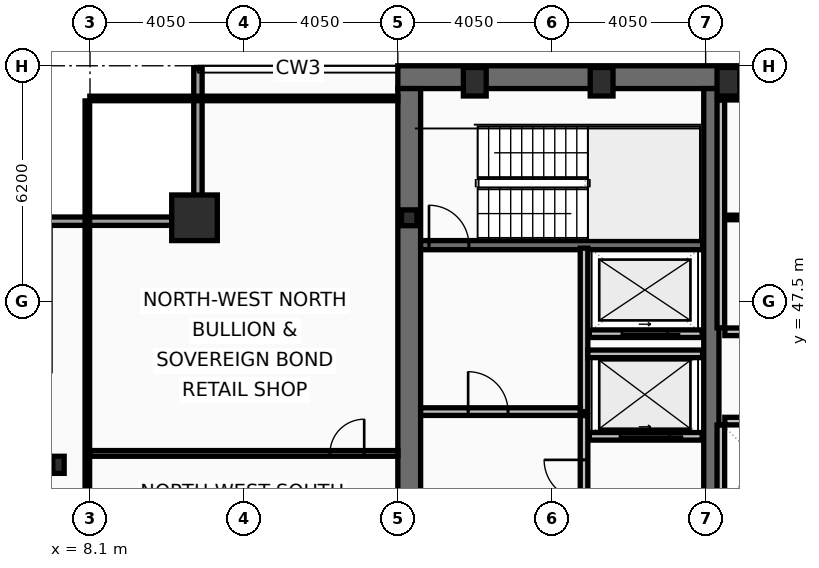
"""IFC4 building model, lengths in metres.
Left out: names, types, materials, properties, quantities, classifications, styles, units other than length and angle.
Written with IfcOpenShell. Run it as: python <this file> out.ifc"""

import sys

from ifc_helpers import new_model, si_unit, direction, frame, frame_2d, origin, origin_2d, place, context, subcontext, project, spatial, rectangle, hollow_rectangle, i_section, extrude, element, fill, save


model = new_model("IFC4")
c1 = context("Model", 3, precision=1e-05, world=origin(), true_north=direction((0.0, 1.0)))
c2 = subcontext(c1, "Body", "Model", "MODEL_VIEW")
j1 = project(units=[si_unit("LENGTHUNIT", "METRE"), si_unit("PLANEANGLEUNIT", "RADIAN")], contexts=[c1])
p1 = place(None, origin())
s1 = spatial("IfcSite", under=j1, at=p1, CompositionType="ELEMENT")
p2 = place(p1, origin())
s2 = spatial("IfcBuilding", under=s1, at=p2, CompositionType="ELEMENT")
p3 = place(p2, frame((0.0, 0.0, 188.6)))
s3 = spatial("IfcBuildingStorey", under=s2, at=p3, CompositionType="ELEMENT", Elevation=188.6)
p4 = place(p3, frame((16.2, 53.4, 0.0), z_axis=(0.0, 0.0, 1.0), x_axis=(1.0, 0.0, 0.0)))
e1 = element("IfcWall", 1, at=p4, inside=s3, PredefinedType="SHEAR", context=c2, shape_type="SweptSolid", body=[
    extrude(rectangle(XDim=40.5, YDim=0.6, at=frame_2d((20.25, 0.0))), origin(), (0.0, 0.0, 1.0), 3.44),
])
p5 = place(p3, frame((16.5, 41.9, 0.0), z_axis=(0.0, 0.0, 1.0), x_axis=(0.0, 1.0, 0.0)))
e2 = element("IfcWall", 2, at=p5, inside=s3, PredefinedType="SHEAR", context=c2, shape_type="SweptSolid", body=[
    extrude(rectangle(XDim=11.2, YDim=0.6, at=frame_2d((5.6, 0.0))), origin(), (0.0, 0.0, 1.0), 3.44),
])
p6 = place(p3, frame((24.45, 41.9, 0.0), z_axis=(0.0, 0.0, 1.0), x_axis=(0.0, 1.0, 0.0)))
e3 = element("IfcWall", 3, at=p6, inside=s3, PredefinedType="SHEAR", context=c2, shape_type="SweptSolid", body=[
    extrude(rectangle(XDim=11.2, YDim=0.4, at=frame_2d((5.6, 0.0))), origin(), (0.0, 0.0, 1.0), 3.44),
])
p7 = place(p3, frame((16.8, 48.98, 0.0), z_axis=(0.0, 0.0, 1.0), x_axis=(1.0, 0.0, 0.0)))
e4 = element("IfcWall", 4, at=p7, inside=s3, PredefinedType="SHEAR", context=c2, shape_type="SweptSolid", body=[
    extrude(rectangle(XDim=7.42, YDim=0.24, at=frame_2d((3.71, 0.0))), origin(), (0.0, 0.0, 1.0), 3.44),
])
p8 = place(p7, frame((0.22, 0.0, 0.0)))
e5 = element("IfcOpeningElement", 5, at=p8, cuts=e4, PredefinedType="OPENING", context=c2, shape_type="SweptSolid", body=[
    extrude(rectangle(XDim=1.05, YDim=2.15, at=frame_2d((0.525, 1.075))), frame((0.0, 0.13, 0.0), z_axis=(0.0, -1.0, 0.0), x_axis=(1.0, 0.0, 0.0)), (0.0, 0.0, 1.0), 0.26),
])
p9 = place(p3, frame((10.85, 49.7, 0.0), z_axis=(0.0, 0.0, 1.0), x_axis=(1.0, 0.0, 0.0)))
e6 = element("IfcColumn", 6, at=p9, inside=s3, PredefinedType="COLUMN", context=c2, shape_type="SweptSolid", body=[
    extrude(hollow_rectangle(XDim=1.2, YDim=1.2, WallThickness=0.06, at=origin_2d()), origin(), (0.0, 0.0, 1.0), 3.6),
])
for number, where, z_axis, x_axis in (
    (7, (18.225, 53.28, 0.0), (0.0, 0.0, 1.0), (1.0, 0.0, 0.0)),
    (8, (21.562, 53.28, 0.0), (0.0, 0.0, 1.0), (1.0, 0.0, 0.0)),
    (9, (24.9, 53.28, 0.0), (0.0, 0.0, 1.0), (1.0, 0.0, 0.0)),
):
    element("IfcColumn", number, at=place(p3, frame(where, z_axis=z_axis, x_axis=x_axis)), inside=s3, PredefinedType="COLUMN", context=c2, shape_type="SweptSolid", body=[
        extrude(hollow_rectangle(XDim=0.6, YDim=0.75, WallThickness=0.045, at=origin_2d()), origin(), (0.0, 0.0, 1.0), 3.6),
    ])
p10 = place(p3, frame((7.27, 43.2, 0.0), z_axis=(0.0, 0.0, 1.0), x_axis=(1.0, 0.0, 0.0)))
e10 = element("IfcColumn", 10, at=p10, inside=s3, PredefinedType="COLUMN", context=c2, shape_type="SweptSolid", body=[
    extrude(i_section(OverallWidth=0.3, OverallDepth=0.45, WebThickness=0.014, FlangeThickness=0.026, at=origin_2d()), origin(), (0.0, 0.0, 1.0), 3.6),
])
p11 = place(p3, frame((16.5, 49.7, 0.0), z_axis=(0.0, 0.0, 1.0), x_axis=(1.0, 0.0, 0.0)))
e11 = element("IfcColumn", 11, at=p11, inside=s3, PredefinedType="COLUMN", context=c2, shape_type="SweptSolid", body=[
    extrude(i_section(OverallWidth=0.406, OverallDepth=0.416, WebThickness=0.03, FlangeThickness=0.048, at=origin_2d()), origin(), (0.0, 0.0, 1.0), 3.6),
])
p12 = place(p3, frame((6.83, 49.61, 0.0), z_axis=(0.0, 0.0, 1.0), x_axis=(1.0, 0.0, 0.0)))
e12 = element("IfcWall", 12, at=p12, inside=s3, PredefinedType="SOLIDWALL", context=c2, shape_type="SweptSolid", body=[
    extrude(rectangle(XDim=4.22, YDim=0.22, at=frame_2d((2.11, 0.0))), origin(), (0.0, 0.0, 1.0), 2.83),
])
p13 = place(p3, frame((10.94, 49.72, 0.0), z_axis=(0.0, 0.0, 1.0), x_axis=(0.0, 1.0, 0.0)))
e13 = element("IfcWall", 13, at=p13, inside=s3, PredefinedType="SOLIDWALL", context=c2, shape_type="SweptSolid", body=[
    extrude(rectangle(XDim=3.91, YDim=0.22, at=frame_2d((1.955, 0.0))), origin(), (0.0, 0.0, 1.0), 2.83),
])
p14 = place(p3, frame((24.21, 43.95, 0.0), z_axis=(0.0, 0.0, 1.0), x_axis=(-1.0, 0.0, 0.0)))
e14 = element("IfcWall", 14, at=p14, inside=s3, PredefinedType="PARTITIONING", context=c2, shape_type="SweptSolid", body=[
    extrude(rectangle(XDim=2.97, YDim=0.2, at=frame_2d((1.485, 0.0))), origin(), (0.0, 0.0, 1.0), 3.44),
])
p15 = place(p14, frame((0.86, 0.0, 0.0)))
e15 = element("IfcOpeningElement", 15, at=p15, cuts=e14, PredefinedType="OPENING", context=c2, shape_type="SweptSolid", body=[
    extrude(rectangle(XDim=1.3, YDim=2.18, at=frame_2d((0.65, 1.09))), frame((0.0, 0.11, 0.0), z_axis=(0.0, -1.0, 0.0), x_axis=(1.0, 0.0, 0.0)), (0.0, 0.0, 1.0), 0.22),
])
p16 = place(p3, frame((24.21, 46.65, 0.0), z_axis=(0.0, 0.0, 1.0), x_axis=(-1.0, 0.0, 0.0)))
e16 = element("IfcWall", 16, at=p16, inside=s3, PredefinedType="PARTITIONING", context=c2, shape_type="SweptSolid", body=[
    extrude(rectangle(XDim=2.97, YDim=0.2, at=frame_2d((1.485, 0.0))), origin(), (0.0, 0.0, 1.0), 3.44),
])
p17 = place(p16, frame((0.91, 0.0, 0.0)))
e17 = element("IfcOpeningElement", 17, at=p17, cuts=e16, PredefinedType="OPENING", context=c2, shape_type="SweptSolid", body=[
    extrude(rectangle(XDim=1.2, YDim=2.18, at=frame_2d((0.6, 1.09))), frame((0.0, 0.11, 0.0), z_axis=(0.0, -1.0, 0.0), x_axis=(1.0, 0.0, 0.0)), (0.0, 0.0, 1.0), 0.22),
])
p18 = place(p3, frame((21.1, 44.6, 0.0), z_axis=(0.0, 0.0, 1.0), x_axis=(0.0, 1.0, 0.0)))
e18 = element("IfcWall", 18, at=p18, inside=s3, PredefinedType="PARTITIONING", context=c2, shape_type="SweptSolid", body=[
    extrude(rectangle(XDim=4.3, YDim=0.2, at=frame_2d((2.15, 0.0))), origin(), (0.0, 0.0, 1.0), 3.44),
])
p19 = place(p3, frame((16.8, 44.6, 0.0), z_axis=(0.0, 0.0, 1.0), x_axis=(1.0, 0.0, 0.0)))
e19 = element("IfcWall", 19, at=p19, inside=s3, PredefinedType="PARTITIONING", context=c2, shape_type="SweptSolid", body=[
    extrude(rectangle(XDim=4.2, YDim=0.2, at=frame_2d((2.1, 0.0))), origin(), (0.0, 0.0, 1.0), 3.44),
])
p20 = place(p19, frame((1.25, 0.0, 0.0)))
e20 = element("IfcOpeningElement", 20, at=p20, cuts=e19, PredefinedType="OPENING", context=c2, shape_type="SweptSolid", body=[
    extrude(rectangle(XDim=1.05, YDim=2.15, at=frame_2d((0.525, 1.075))), frame((0.0, 0.11, 0.0), z_axis=(0.0, -1.0, 0.0), x_axis=(1.0, 0.0, 0.0)), (0.0, 0.0, 1.0), 0.22),
])
p21 = place(p3, frame((21.2, 46.12, 0.0), z_axis=(0.0, 0.0, 1.0), x_axis=(1.0, 0.0, 0.0)))
e21 = element("IfcWall", 21, at=p21, inside=s3, PredefinedType="PARTITIONING", context=c2, shape_type="SweptSolid", body=[
    extrude(rectangle(XDim=3.02, YDim=0.2, at=frame_2d((1.51, 0.0))), origin(), (0.0, 0.0, 1.0), 3.44),
])
p22 = place(p3, frame((21.1, 41.9, 0.0), z_axis=(0.0, 0.0, 1.0), x_axis=(0.0, 1.0, 0.0)))
e22 = element("IfcWall", 22, at=p22, inside=s3, PredefinedType="PARTITIONING", context=c2, shape_type="SweptSolid", body=[
    extrude(rectangle(XDim=2.595, YDim=0.2, at=frame_2d((1.298, 0.0))), origin(), (0.0, 0.0, 1.0), 3.44),
])
p23 = place(p22, frame((0.38, 0.0, 0.0)))
e23 = element("IfcOpeningElement", 23, at=p23, cuts=e22, PredefinedType="OPENING", context=c2, shape_type="SweptSolid", body=[
    extrude(rectangle(XDim=1.05, YDim=2.15, at=frame_2d((0.525, 1.075))), frame((0.0, 0.11, 0.0), z_axis=(0.0, -1.0, 0.0), x_axis=(1.0, 0.0, 0.0)), (0.0, 0.0, 1.0), 0.22),
])
p24 = place(p3, frame((24.7, 46.805, 0.0), z_axis=(0.0, 0.0, 1.0), x_axis=(0.0, 1.0, 0.0)))
e24 = element("IfcWall", 24, at=p24, inside=s3, PredefinedType="PARTITIONING", context=c2, shape_type="SweptSolid", body=[
    extrude(rectangle(XDim=5.99, YDim=0.2, at=frame_2d((2.995, 0.0))), origin(), (0.0, 0.0, 1.0), 3.44),
])
p25 = place(p3, frame((24.805, 52.86, 0.0), z_axis=(0.0, 0.0, 1.0), x_axis=(1.0, 0.0, 0.0)))
e25 = element("IfcWall", 25, at=p25, inside=s3, PredefinedType="PARTITIONING", context=c2, shape_type="SweptSolid", body=[
    extrude(rectangle(XDim=7.51, YDim=0.12, at=frame_2d((3.755, 0.0))), origin(), (0.0, 0.0, 1.0), 3.44),
])
p26 = place(p3, frame((24.805, 49.709, 0.0), z_axis=(0.0, 0.0, 1.0), x_axis=(1.0, 0.0, 0.0)))
e26 = element("IfcWall", 26, at=p26, inside=s3, PredefinedType="PARTITIONING", context=c2, shape_type="SweptSolid", body=[
    extrude(rectangle(XDim=7.51, YDim=0.12, at=frame_2d((3.755, 0.0))), origin(), (0.0, 0.0, 1.0), 3.44),
])
p27 = place(p26, frame((2.4, 0.0, 0.0)))
e27 = element("IfcOpeningElement", 27, at=p27, cuts=e26, PredefinedType="OPENING", context=c2, shape_type="SweptSolid", body=[
    extrude(rectangle(XDim=0.9, YDim=2.05, at=frame_2d((0.45, 1.025))), frame((0.0, 0.07, 0.0), z_axis=(0.0, -1.0, 0.0), x_axis=(1.0, 0.0, 0.0)), (0.0, 0.0, 1.0), 0.14),
])
p28 = place(p3, frame((24.805, 46.7, 0.0), z_axis=(0.0, 0.0, 1.0), x_axis=(1.0, 0.0, 0.0)))
e28 = element("IfcWall", 28, at=p28, inside=s3, PredefinedType="PARTITIONING", context=c2, shape_type="SweptSolid", body=[
    extrude(rectangle(XDim=7.51, YDim=0.2, at=frame_2d((3.755, 0.0))), origin(), (0.0, 0.0, 1.0), 3.44),
])
p29 = place(p28, frame((2.4, 0.0, 0.0)))
e29 = element("IfcOpeningElement", 29, at=p29, cuts=e28, PredefinedType="OPENING", context=c2, shape_type="SweptSolid", body=[
    extrude(rectangle(XDim=0.95, YDim=2.1, at=frame_2d((0.475, 1.05))), frame((0.0, 0.11, 0.0), z_axis=(0.0, -1.0, 0.0), x_axis=(1.0, 0.0, 0.0)), (0.0, 0.0, 1.0), 0.22),
])
p30 = place(p3, frame((24.805, 44.35, 0.0), z_axis=(0.0, 0.0, 1.0), x_axis=(1.0, 0.0, 0.0)))
e30 = element("IfcWall", 30, at=p30, inside=s3, PredefinedType="PARTITIONING", context=c2, shape_type="SweptSolid", body=[
    extrude(rectangle(XDim=6.27, YDim=0.2, at=frame_2d((3.135, 0.0))), origin(), (0.0, 0.0, 1.0), 3.44),
])
p31 = place(p3, frame((24.7, 41.95, 0.0), z_axis=(0.0, 0.0, 1.0), x_axis=(0.0, 1.0, 0.0)))
e31 = element("IfcWall", 31, at=p31, inside=s3, PredefinedType="PARTITIONING", context=c2, shape_type="SweptSolid", body=[
    extrude(rectangle(XDim=2.295, YDim=0.2, at=frame_2d((1.147, 0.0))), origin(), (0.0, 0.0, 1.0), 3.44),
])
p32 = place(p3, frame((8.095, 43.5, 0.0), z_axis=(0.0, 0.0, 1.0), x_axis=(1.0, 0.0, 0.0)))
e32 = element("IfcWall", 32, at=p32, inside=s3, PredefinedType="PARTITIONING", context=c2, shape_type="SweptSolid", body=[
    extrude(rectangle(XDim=8.105, YDim=0.15, at=frame_2d((4.052, 0.0))), origin(), (0.0, 0.0, 1.0), 2.73),
])
p33 = place(p32, frame((6.32, 0.0, 0.0)))
e33 = element("IfcOpeningElement", 33, at=p33, cuts=e32, PredefinedType="OPENING", context=c2, shape_type="SweptSolid", body=[
    extrude(rectangle(XDim=0.9, YDim=2.05, at=frame_2d((0.45, 1.025))), frame((0.0, 0.085, 0.0), z_axis=(0.0, -1.0, 0.0), x_axis=(1.0, 0.0, 0.0)), (0.0, 0.0, 1.0), 0.17),
])
p34 = place(p3, frame((8.03, 10.665, 0.0), z_axis=(0.0, 0.0, 1.0), x_axis=(0.0, 1.0, 0.0)))
e34 = element("IfcWall", 34, at=p34, inside=s3, PredefinedType="PARTITIONING", context=c2, shape_type="SweptSolid", body=[
    extrude(rectangle(XDim=42.11, YDim=0.12, at=frame_2d((21.055, 0.0))), origin(), (0.0, 0.0, 1.0), 2.73),
])
p35 = place(p3, frame((8.095, 52.84, 0.0), z_axis=(0.0, 0.0, 1.0), x_axis=(1.0, 0.0, 0.0)))
e35 = element("IfcWall", 35, at=p35, inside=s3, PredefinedType="PARTITIONING", context=c2, shape_type="SweptSolid", body=[
    extrude(rectangle(XDim=8.105, YDim=0.12, at=frame_2d((4.052, 0.0))), origin(), (0.0, 0.0, 1.0), 3.44),
])
p36 = place(p8, origin())
e36 = element("IfcDoor", 36, at=p36, inside=s3, OperationType="SINGLE_SWING_LEFT", PredefinedType="DOOR", context=c2, shape_type="SweptSolid", body=[
    extrude(rectangle(XDim=1.05, YDim=2.15, at=frame_2d((0.525, 1.075))), frame((0.0, 0.025, 0.0), z_axis=(0.0, -1.0, 0.0), x_axis=(1.0, 0.0, 0.0)), (0.0, 0.0, 1.0), 0.05),
])
fill(e5, e36)
p37 = place(p15, origin())
e37 = element("IfcDoor", 37, at=p37, inside=s3, OperationType="SLIDING_TO_LEFT", PredefinedType="DOOR", context=c2, shape_type="SweptSolid", body=[
    extrude(rectangle(XDim=1.3, YDim=2.18, at=frame_2d((0.65, 1.09))), frame((0.0, 0.025, 0.0), z_axis=(0.0, -1.0, 0.0), x_axis=(1.0, 0.0, 0.0)), (0.0, 0.0, 1.0), 0.05),
])
fill(e15, e37)
p38 = place(p17, origin())
e38 = element("IfcDoor", 38, at=p38, inside=s3, OperationType="SLIDING_TO_LEFT", PredefinedType="DOOR", context=c2, shape_type="SweptSolid", body=[
    extrude(rectangle(XDim=1.2, YDim=2.18, at=frame_2d((0.6, 1.09))), frame((0.0, 0.025, 0.0), z_axis=(0.0, -1.0, 0.0), x_axis=(1.0, 0.0, 0.0)), (0.0, 0.0, 1.0), 0.05),
])
fill(e17, e38)
p39 = place(p20, origin())
e39 = element("IfcDoor", 39, at=p39, inside=s3, OperationType="SINGLE_SWING_LEFT", PredefinedType="DOOR", context=c2, shape_type="SweptSolid", body=[
    extrude(rectangle(XDim=1.05, YDim=2.15, at=frame_2d((0.525, 1.075))), frame((0.0, 0.025, 0.0), z_axis=(0.0, -1.0, 0.0), x_axis=(1.0, 0.0, 0.0)), (0.0, 0.0, 1.0), 0.05),
])
fill(e20, e39)
p40 = place(p23, origin())
e40 = element("IfcDoor", 40, at=p40, inside=s3, OperationType="SINGLE_SWING_RIGHT", PredefinedType="DOOR", context=c2, shape_type="SweptSolid", body=[
    extrude(rectangle(XDim=1.05, YDim=2.15, at=frame_2d((0.525, 1.075))), frame((0.0, 0.025, 0.0), z_axis=(0.0, -1.0, 0.0), x_axis=(1.0, 0.0, 0.0)), (0.0, 0.0, 1.0), 0.05),
])
fill(e23, e40)
p41 = place(p33, origin())
e41 = element("IfcDoor", 41, at=p41, inside=s3, OperationType="SINGLE_SWING_RIGHT", PredefinedType="DOOR", context=c2, shape_type="SweptSolid", body=[
    extrude(rectangle(XDim=0.9, YDim=2.05, at=frame_2d((0.45, 1.025))), frame((0.0, 0.025, 0.0), z_axis=(0.0, -1.0, 0.0), x_axis=(1.0, 0.0, 0.0)), (0.0, 0.0, 1.0), 0.05),
])
fill(e33, e41)
save(model, sys.argv[1])
